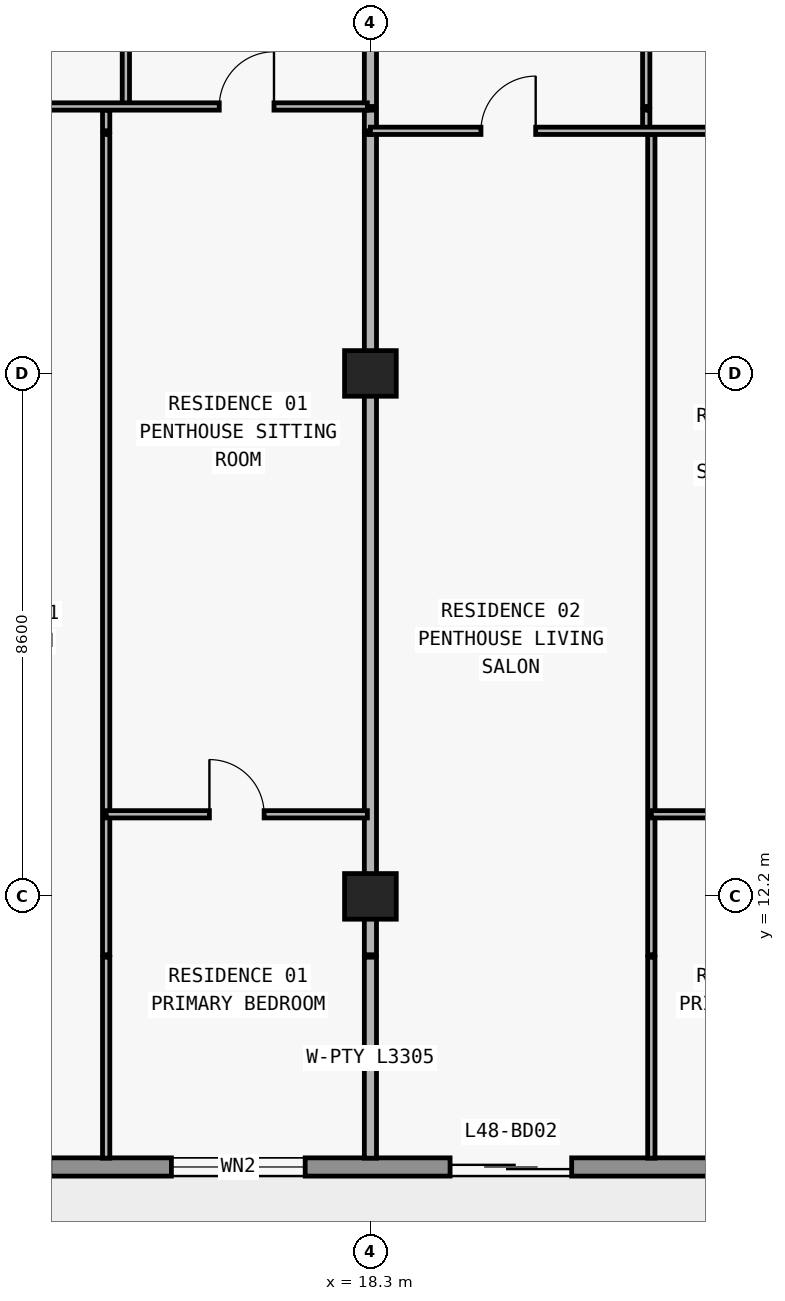
"""IFC4 building model, lengths in metres.
Left out: names, types, materials, properties, quantities, classifications, styles, units other than length and angle.
Written with IfcOpenShell. Run it as: python <this file> out.ifc"""

import sys

from ifc_helpers import new_model, si_unit, direction, frame, frame_2d, origin, origin_2d, place, context, subcontext, project, spatial, rectangle, extrude, element, fill, save


model = new_model("IFC4")
c1 = context("Model", 3, precision=1e-05, world=origin(), true_north=direction((0.0, 1.0)))
c2 = subcontext(c1, "Body", "Model", "MODEL_VIEW")
j1 = project(units=[si_unit("LENGTHUNIT", "METRE"), si_unit("PLANEANGLEUNIT", "RADIAN")], contexts=[c1])
p1 = place(None, origin())
s1 = spatial("IfcSite", under=j1, at=p1, CompositionType="ELEMENT")
p2 = place(p1, origin())
s2 = spatial("IfcBuilding", under=s1, at=p2, CompositionType="ELEMENT")
p3 = place(p2, frame((0.0, 0.0, 173.7)))
s3 = spatial("IfcBuildingStorey", under=s2, at=p3, CompositionType="ELEMENT", Elevation=173.7)
for number, where, z_axis, x_axis in (
    (1, (18.3, 12.2, 0.0), (0.0, 0.0, 1.0), (1.0, 0.0, 0.0)),
    (2, (18.3, 20.8, 0.0), (0.0, 0.0, 1.0), (1.0, 0.0, 0.0)),
):
    element("IfcColumn", number, at=place(p3, frame(where, z_axis=z_axis, x_axis=x_axis)), inside=s3, PredefinedType="COLUMN", context=c2, shape_type="SweptSolid", body=[
        extrude(rectangle(XDim=0.85, YDim=0.75, at=origin_2d()), origin(), (0.0, 0.0, 1.0), 3.05),
    ])
p4 = place(p3, frame((67.7, 7.75, 0.0), z_axis=(0.0, 0.0, 1.0), x_axis=(-1.0, 0.0, 0.0)))
e3 = element("IfcWall", 3, at=p4, inside=s3, PredefinedType="STANDARD", context=c2, shape_type="SweptSolid", body=[
    extrude(rectangle(XDim=57.6, YDim=0.3, at=frame_2d((28.8, 0.0))), origin(), (0.0, 0.0, 1.0), 3.05),
])
p5 = place(p4, frame((54.673, 0.0, 0.0)))
e4 = element("IfcOpeningElement", 4, at=p5, cuts=e3, PredefinedType="OPENING", context=c2, shape_type="SweptSolid", body=[
    extrude(rectangle(XDim=2.0, YDim=2.3, at=frame_2d((1.0, 1.15))), frame((0.0, 0.16, 0.0), z_axis=(0.0, -1.0, 0.0), x_axis=(1.0, 0.0, 0.0)), (0.0, 0.0, 1.0), 0.32),
])
p6 = place(p4, frame((50.473, 0.0, 0.85)))
e5 = element("IfcOpeningElement", 5, at=p6, cuts=e3, PredefinedType="OPENING", context=c2, shape_type="SweptSolid", body=[
    extrude(rectangle(XDim=2.2, YDim=1.55, at=frame_2d((1.1, 0.775))), frame((0.0, 0.16, 0.0), z_axis=(0.0, -1.0, 0.0), x_axis=(1.0, 0.0, 0.0)), (0.0, 0.0, 1.0), 0.32),
])
p7 = place(p4, frame((46.09, 0.0, 0.0)))
e6 = element("IfcOpeningElement", 6, at=p7, cuts=e3, PredefinedType="OPENING", context=c2, shape_type="SweptSolid", body=[
    extrude(rectangle(XDim=2.0, YDim=2.3, at=frame_2d((1.0, 1.15))), frame((0.0, 0.16, 0.0), z_axis=(0.0, -1.0, 0.0), x_axis=(1.0, 0.0, 0.0)), (0.0, 0.0, 1.0), 0.32),
])
p8 = place(p4, frame((41.99, 0.0, 0.85)))
e7 = element("IfcOpeningElement", 7, at=p8, cuts=e3, PredefinedType="OPENING", context=c2, shape_type="SweptSolid", body=[
    extrude(rectangle(XDim=1.8, YDim=1.55, at=frame_2d((0.9, 0.775))), frame((0.0, 0.16, 0.0), z_axis=(0.0, -1.0, 0.0), x_axis=(1.0, 0.0, 0.0)), (0.0, 0.0, 1.0), 0.32),
])
p9 = place(p4, frame((38.09, 0.0, 0.0)))
e8 = element("IfcOpeningElement", 8, at=p9, cuts=e3, PredefinedType="OPENING", context=c2, shape_type="SweptSolid", body=[
    extrude(rectangle(XDim=2.0, YDim=2.3, at=frame_2d((1.0, 1.15))), frame((0.0, 0.16, 0.0), z_axis=(0.0, -1.0, 0.0), x_axis=(1.0, 0.0, 0.0)), (0.0, 0.0, 1.0), 0.32),
])
p10 = place(p4, frame((33.41, 0.0, 0.65)))
e9 = element("IfcOpeningElement", 9, at=p10, cuts=e3, PredefinedType="OPENING", context=c2, shape_type="SweptSolid", body=[
    extrude(rectangle(XDim=2.6, YDim=1.85, at=frame_2d((1.3, 0.925))), frame((0.0, 0.16, 0.0), z_axis=(0.0, -1.0, 0.0), x_axis=(1.0, 0.0, 0.0)), (0.0, 0.0, 1.0), 0.32),
])
p11 = place(p4, frame((27.7, 0.0, 0.85)))
e10 = element("IfcOpeningElement", 10, at=p11, cuts=e3, PredefinedType="OPENING", context=c2, shape_type="SweptSolid", body=[
    extrude(rectangle(XDim=2.2, YDim=1.55, at=frame_2d((1.1, 0.775))), frame((0.0, 0.16, 0.0), z_axis=(0.0, -1.0, 0.0), x_axis=(1.0, 0.0, 0.0)), (0.0, 0.0, 1.0), 0.32),
])
p12 = place(p4, frame((19.7, 0.0, 0.85)))
e11 = element("IfcOpeningElement", 11, at=p12, cuts=e3, PredefinedType="OPENING", context=c2, shape_type="SweptSolid", body=[
    extrude(rectangle(XDim=2.2, YDim=1.55, at=frame_2d((1.1, 0.775))), frame((0.0, 0.16, 0.0), z_axis=(0.0, -1.0, 0.0), x_axis=(1.0, 0.0, 0.0)), (0.0, 0.0, 1.0), 0.32),
])
p13 = place(p4, frame((13.29, 0.0, 0.0)))
e12 = element("IfcOpeningElement", 12, at=p13, cuts=e3, PredefinedType="OPENING", context=c2, shape_type="SweptSolid", body=[
    extrude(rectangle(XDim=2.0, YDim=2.3, at=frame_2d((1.0, 1.15))), frame((0.0, 0.16, 0.0), z_axis=(0.0, -1.0, 0.0), x_axis=(1.0, 0.0, 0.0)), (0.0, 0.0, 1.0), 0.32),
])
p14 = place(p4, frame((9.19, 0.0, 0.85)))
e13 = element("IfcOpeningElement", 13, at=p14, cuts=e3, PredefinedType="OPENING", context=c2, shape_type="SweptSolid", body=[
    extrude(rectangle(XDim=1.8, YDim=1.55, at=frame_2d((0.9, 0.775))), frame((0.0, 0.16, 0.0), z_axis=(0.0, -1.0, 0.0), x_axis=(1.0, 0.0, 0.0)), (0.0, 0.0, 1.0), 0.32),
])
p15 = place(p4, frame((5.273, 0.0, 0.0)))
e14 = element("IfcOpeningElement", 14, at=p15, cuts=e3, PredefinedType="OPENING", context=c2, shape_type="SweptSolid", body=[
    extrude(rectangle(XDim=2.0, YDim=2.3, at=frame_2d((1.0, 1.15))), frame((0.0, 0.16, 0.0), z_axis=(0.0, -1.0, 0.0), x_axis=(1.0, 0.0, 0.0)), (0.0, 0.0, 1.0), 0.32),
])
p16 = place(p4, frame((1.073, 0.0, 0.85)))
e15 = element("IfcOpeningElement", 15, at=p16, cuts=e3, PredefinedType="OPENING", context=c2, shape_type="SweptSolid", body=[
    extrude(rectangle(XDim=2.2, YDim=1.55, at=frame_2d((1.1, 0.775))), frame((0.0, 0.16, 0.0), z_axis=(0.0, -1.0, 0.0), x_axis=(1.0, 0.0, 0.0)), (0.0, 0.0, 1.0), 0.32),
])
p17 = place(p3, frame((13.954, 7.895, 0.0), z_axis=(0.0, 0.0, 1.0), x_axis=(0.0, 1.0, 0.0)))
e16 = element("IfcWall", 16, at=p17, inside=s3, PredefinedType="PARTITIONING", context=c2, shape_type="SweptSolid", body=[
    extrude(rectangle(XDim=3.305, YDim=0.12, at=frame_2d((1.652, 0.0))), origin(), (0.0, 0.0, 1.0), 3.05),
])
p18 = place(p3, frame((13.954, 11.24, 0.0), z_axis=(0.0, 0.0, 1.0), x_axis=(0.0, 1.0, 0.0)))
e17 = element("IfcWall", 17, at=p18, inside=s3, PredefinedType="PARTITIONING", context=c2, shape_type="SweptSolid", body=[
    extrude(rectangle(XDim=13.49, YDim=0.12, at=frame_2d((6.745, 0.0))), origin(), (0.0, 0.0, 1.0), 3.05),
])
p19 = place(p3, frame((13.954, 24.79, 0.0), z_axis=(0.0, 0.0, 1.0), x_axis=(0.0, 1.0, 0.0)))
e18 = element("IfcWall", 18, at=p19, inside=s3, PredefinedType="PARTITIONING", context=c2, shape_type="SweptSolid", body=[
    extrude(rectangle(XDim=0.34, YDim=0.12, at=frame_2d((0.17, 0.0))), origin(), (0.0, 0.0, 1.0), 3.05),
])
p20 = place(p3, frame((14.278, 25.19, 0.0), z_axis=(0.0, 0.0, 1.0), x_axis=(0.0, 1.0, 0.0)))
e19 = element("IfcWall", 19, at=p20, inside=s3, PredefinedType="PARTITIONING", context=c2, shape_type="SweptSolid", body=[
    extrude(rectangle(XDim=4.69, YDim=0.12, at=frame_2d((2.345, 0.0))), origin(), (0.0, 0.0, 1.0), 3.05),
])
p21 = place(p20, frame((1.895, 0.0, 0.0)))
e20 = element("IfcOpeningElement", 20, at=p21, cuts=e19, PredefinedType="OPENING", context=c2, shape_type="SweptSolid", body=[
    extrude(rectangle(XDim=0.9, YDim=2.15, at=frame_2d((0.45, 1.075))), frame((0.0, 0.07, 0.0), z_axis=(0.0, -1.0, 0.0), x_axis=(1.0, 0.0, 0.0)), (0.0, 0.0, 1.0), 0.14),
])
p22 = place(p3, frame((18.3, 7.895, 0.0), z_axis=(0.0, 0.0, 1.0), x_axis=(0.0, 1.0, 0.0)))
e21 = element("IfcWall", 21, at=p22, inside=s3, PredefinedType="PARTITIONING", context=c2, shape_type="SweptSolid", body=[
    extrude(rectangle(XDim=3.305, YDim=0.2, at=frame_2d((1.652, 0.0))), origin(), (0.0, 0.0, 1.0), 3.05),
])
p23 = place(p3, frame((18.3, 11.24, 0.0), z_axis=(0.0, 0.0, 1.0), x_axis=(0.0, 1.0, 0.0)))
e22 = element("IfcWall", 22, at=p23, inside=s3, PredefinedType="PARTITIONING", context=c2, shape_type="SweptSolid", body=[
    extrude(rectangle(XDim=13.49, YDim=0.2, at=frame_2d((6.745, 0.0))), origin(), (0.0, 0.0, 1.0), 2.263),
])
p24 = place(p3, frame((18.3, 24.79, 0.0), z_axis=(0.0, 0.0, 1.0), x_axis=(0.0, 1.0, 0.0)))
e23 = element("IfcWall", 23, at=p24, inside=s3, PredefinedType="PARTITIONING", context=c2, shape_type="SweptSolid", body=[
    extrude(rectangle(XDim=0.34, YDim=0.2, at=frame_2d((0.17, 0.0))), origin(), (0.0, 0.0, 1.0), 2.263),
])
p25 = place(p3, frame((18.3, 25.19, 0.0), z_axis=(0.0, 0.0, 1.0), x_axis=(0.0, 1.0, 0.0)))
e24 = element("IfcWall", 24, at=p25, inside=s3, PredefinedType="PARTITIONING", context=c2, shape_type="SweptSolid", body=[
    extrude(rectangle(XDim=4.69, YDim=0.2, at=frame_2d((2.345, 0.0))), origin(), (0.0, 0.0, 1.0), 2.263),
])
p26 = place(p3, frame((22.836, 24.79, 0.0), z_axis=(0.0, 0.0, 1.0), x_axis=(0.0, 1.0, 0.0)))
e25 = element("IfcWall", 25, at=p26, inside=s3, PredefinedType="PARTITIONING", context=c2, shape_type="SweptSolid", body=[
    extrude(rectangle(XDim=0.34, YDim=0.12, at=frame_2d((0.17, 0.0))), origin(), (0.0, 0.0, 1.0), 3.05),
])
p27 = place(p3, frame((22.836, 25.19, 0.0), z_axis=(0.0, 0.0, 1.0), x_axis=(0.0, 1.0, 0.0)))
e26 = element("IfcWall", 26, at=p27, inside=s3, PredefinedType="PARTITIONING", context=c2, shape_type="SweptSolid", body=[
    extrude(rectangle(XDim=4.69, YDim=0.12, at=frame_2d((2.345, 0.0))), origin(), (0.0, 0.0, 1.0), 3.05),
])
p28 = place(p27, frame((1.895, 0.0, 0.0)))
e27 = element("IfcOpeningElement", 27, at=p28, cuts=e26, PredefinedType="OPENING", context=c2, shape_type="SweptSolid", body=[
    extrude(rectangle(XDim=0.9, YDim=2.15, at=frame_2d((0.45, 1.075))), frame((0.0, 0.07, 0.0), z_axis=(0.0, -1.0, 0.0), x_axis=(1.0, 0.0, 0.0)), (0.0, 0.0, 1.0), 0.14),
])
p29 = place(p3, frame((22.92, 7.895, 0.0), z_axis=(0.0, 0.0, 1.0), x_axis=(0.0, 1.0, 0.0)))
e28 = element("IfcWall", 28, at=p29, inside=s3, PredefinedType="PARTITIONING", context=c2, shape_type="SweptSolid", body=[
    extrude(rectangle(XDim=3.305, YDim=0.12, at=frame_2d((1.652, 0.0))), origin(), (0.0, 0.0, 1.0), 3.05),
])
p30 = place(p3, frame((22.92, 11.24, 0.0), z_axis=(0.0, 0.0, 1.0), x_axis=(0.0, 1.0, 0.0)))
e29 = element("IfcWall", 29, at=p30, inside=s3, PredefinedType="PARTITIONING", context=c2, shape_type="SweptSolid", body=[
    extrude(rectangle(XDim=13.49, YDim=0.12, at=frame_2d((6.745, 0.0))), origin(), (0.0, 0.0, 1.0), 3.05),
])
p31 = place(p3, frame((13.954, 13.55, 0.0), z_axis=(0.0, 0.0, 1.0), x_axis=(1.0, 0.0, 0.0)))
e30 = element("IfcWall", 30, at=p31, inside=s3, PredefinedType="PARTITIONING", context=c2, shape_type="SweptSolid", body=[
    extrude(rectangle(XDim=4.296, YDim=0.12, at=frame_2d((2.148, 0.0))), origin(), (0.0, 0.0, 1.0), 3.05),
])
p32 = place(p31, frame((1.698, 0.0, 0.0)))
e31 = element("IfcOpeningElement", 31, at=p32, cuts=e30, PredefinedType="OPENING", context=c2, shape_type="SweptSolid", body=[
    extrude(rectangle(XDim=0.9, YDim=2.15, at=frame_2d((0.45, 1.075))), frame((0.0, 0.07, 0.0), z_axis=(0.0, -1.0, 0.0), x_axis=(1.0, 0.0, 0.0)), (0.0, 0.0, 1.0), 0.14),
])
p33 = place(p3, frame((22.92, 13.55, 0.0), z_axis=(0.0, 0.0, 1.0), x_axis=(1.0, 0.0, 0.0)))
e32 = element("IfcWall", 32, at=p33, inside=s3, PredefinedType="PARTITIONING", context=c2, shape_type="SweptSolid", body=[
    extrude(rectangle(XDim=3.78, YDim=0.12, at=frame_2d((1.89, 0.0))), origin(), (0.0, 0.0, 1.0), 3.05),
])
p34 = place(p33, frame((1.44, 0.0, 0.0)))
e33 = element("IfcOpeningElement", 33, at=p34, cuts=e32, PredefinedType="OPENING", context=c2, shape_type="SweptSolid", body=[
    extrude(rectangle(XDim=0.9, YDim=2.15, at=frame_2d((0.45, 1.075))), frame((0.0, 0.07, 0.0), z_axis=(0.0, -1.0, 0.0), x_axis=(1.0, 0.0, 0.0)), (0.0, 0.0, 1.0), 0.14),
])
p35 = place(p3, frame((18.3, 24.79, 0.0), z_axis=(0.0, 0.0, 1.0), x_axis=(1.0, 0.0, 0.0)))
e34 = element("IfcWall", 34, at=p35, inside=s3, PredefinedType="PARTITIONING", context=c2, shape_type="SweptSolid", body=[
    extrude(rectangle(XDim=8.18, YDim=0.12, at=frame_2d((4.09, 0.0))), origin(), (0.0, 0.0, 1.0), 3.05),
])
p36 = place(p35, frame((1.818, 0.0, 0.0)))
e35 = element("IfcOpeningElement", 35, at=p36, cuts=e34, PredefinedType="OPENING", context=c2, shape_type="SweptSolid", body=[
    extrude(rectangle(XDim=0.9, YDim=2.15, at=frame_2d((0.45, 1.075))), frame((0.0, 0.07, 0.0), z_axis=(0.0, -1.0, 0.0), x_axis=(1.0, 0.0, 0.0)), (0.0, 0.0, 1.0), 0.14),
])
p37 = place(p35, frame((5.95, 0.0, 0.0)))
e36 = element("IfcOpeningElement", 36, at=p37, cuts=e34, PredefinedType="OPENING", context=c2, shape_type="SweptSolid", body=[
    extrude(rectangle(XDim=0.9, YDim=2.15, at=frame_2d((0.45, 1.075))), frame((0.0, 0.07, 0.0), z_axis=(0.0, -1.0, 0.0), x_axis=(1.0, 0.0, 0.0)), (0.0, 0.0, 1.0), 0.14),
])
p38 = place(p3, frame((10.1, 25.19, 0.0), z_axis=(0.0, 0.0, 1.0), x_axis=(1.0, 0.0, 0.0)))
e37 = element("IfcWall", 37, at=p38, inside=s3, PredefinedType="PARTITIONING", context=c2, shape_type="SweptSolid", body=[
    extrude(rectangle(XDim=8.15, YDim=0.12, at=frame_2d((4.075, 0.0))), origin(), (0.0, 0.0, 1.0), 3.05),
])
p39 = place(p38, frame((1.477, 0.0, 0.0)))
e38 = element("IfcOpeningElement", 38, at=p39, cuts=e37, PredefinedType="OPENING", context=c2, shape_type="SweptSolid", body=[
    extrude(rectangle(XDim=0.9, YDim=2.15, at=frame_2d((0.45, 1.075))), frame((0.0, 0.07, 0.0), z_axis=(0.0, -1.0, 0.0), x_axis=(1.0, 0.0, 0.0)), (0.0, 0.0, 1.0), 0.14),
])
p40 = place(p38, frame((5.714, 0.0, 0.0)))
e39 = element("IfcOpeningElement", 39, at=p40, cuts=e37, PredefinedType="OPENING", context=c2, shape_type="SweptSolid", body=[
    extrude(rectangle(XDim=0.9, YDim=2.15, at=frame_2d((0.45, 1.075))), frame((0.0, 0.07, 0.0), z_axis=(0.0, -1.0, 0.0), x_axis=(1.0, 0.0, 0.0)), (0.0, 0.0, 1.0), 0.14),
])
p41 = place(p6, origin())
e40 = element("IfcWindow", 40, at=p41, inside=s3, PartitioningType="SINGLE_PANEL", PredefinedType="WINDOW", context=c2, shape_type="SweptSolid", body=[
    extrude(rectangle(XDim=2.2, YDim=1.55, at=frame_2d((1.1, 0.775))), frame((0.0, 0.03, 0.0), z_axis=(0.0, -1.0, 0.0), x_axis=(1.0, 0.0, 0.0)), (0.0, 0.0, 1.0), 0.06),
])
fill(e5, e40)
p42 = place(p7, origin())
e41 = element("IfcDoor", 41, at=p42, inside=s3, OperationType="DOUBLE_DOOR_SLIDING", PredefinedType="DOOR", context=c2, shape_type="SweptSolid", body=[
    extrude(rectangle(XDim=2.0, YDim=2.3, at=frame_2d((1.0, 1.15))), frame((0.0, 0.025, 0.0), z_axis=(0.0, -1.0, 0.0), x_axis=(1.0, 0.0, 0.0)), (0.0, 0.0, 1.0), 0.05),
])
fill(e6, e41)
p43 = place(p40, origin())
e42 = element("IfcDoor", 42, at=p43, inside=s3, OperationType="SINGLE_SWING_RIGHT", PredefinedType="DOOR", context=c2, shape_type="SweptSolid", body=[
    extrude(rectangle(XDim=0.9, YDim=2.15, at=frame_2d((0.45, 1.075))), frame((0.0, 0.025, 0.0), z_axis=(0.0, -1.0, 0.0), x_axis=(1.0, 0.0, 0.0)), (0.0, 0.0, 1.0), 0.05),
])
fill(e39, e42)
p44 = place(p32, origin())
e43 = element("IfcDoor", 43, at=p44, inside=s3, OperationType="SINGLE_SWING_LEFT", PredefinedType="DOOR", context=c2, shape_type="SweptSolid", body=[
    extrude(rectangle(XDim=0.9, YDim=2.15, at=frame_2d((0.45, 1.075))), frame((0.0, 0.025, 0.0), z_axis=(0.0, -1.0, 0.0), x_axis=(1.0, 0.0, 0.0)), (0.0, 0.0, 1.0), 0.05),
])
fill(e31, e43)
p45 = place(p36, origin())
e44 = element("IfcDoor", 44, at=p45, inside=s3, OperationType="SINGLE_SWING_RIGHT", PredefinedType="DOOR", context=c2, shape_type="SweptSolid", body=[
    extrude(rectangle(XDim=0.9, YDim=2.15, at=frame_2d((0.45, 1.075))), frame((0.0, 0.025, 0.0), z_axis=(0.0, -1.0, 0.0), x_axis=(1.0, 0.0, 0.0)), (0.0, 0.0, 1.0), 0.05),
])
fill(e35, e44)
save(model, sys.argv[1])
